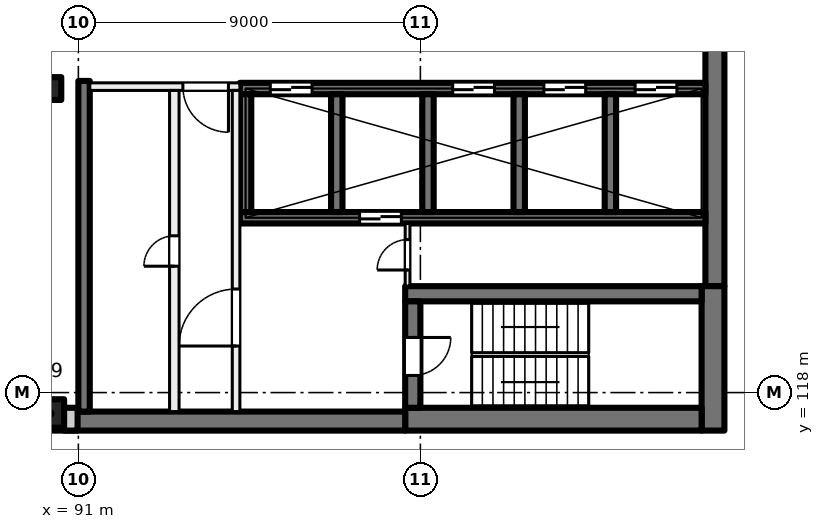
"""IFC4 building model, lengths in metres.
Left out: names, types, materials, properties, quantities, classifications, styles, units other than length and angle.
Written with IfcOpenShell. Run it as: python <this file> out.ifc"""

import sys

from ifc_helpers import new_model, si_unit, direction, frame, frame_2d, origin, origin_2d, place, context, subcontext, project, spatial, rectangle, extrude, element, fill, save


model = new_model("IFC4")
c1 = context("Model", 3, precision=1e-05, world=origin(), true_north=direction((0.0, 1.0)))
c2 = subcontext(c1, "Body", "Model", "MODEL_VIEW")
j1 = project(units=[si_unit("LENGTHUNIT", "METRE"), si_unit("PLANEANGLEUNIT", "RADIAN")], contexts=[c1])
p1 = place(None, origin())
s1 = spatial("IfcSite", under=j1, at=p1, CompositionType="ELEMENT")
p2 = place(p1, origin())
s2 = spatial("IfcBuilding", under=s1, at=p2, CompositionType="ELEMENT")
p3 = place(p2, frame((0.0, 0.0, 220.0)))
s3 = spatial("IfcBuildingStorey", under=s2, at=p3, CompositionType="ELEMENT", Elevation=220.0)
p4 = place(p3, frame((90.25, 126.0, 0.0), z_axis=(0.0, 0.0, 1.0), x_axis=(1.0, 0.0, 0.0)))
e1 = element("IfcColumn", 1, at=p4, inside=s3, PredefinedType="COLUMN", context=c2, shape_type="SweptSolid", body=[
    extrude(rectangle(XDim=0.6, YDim=0.6, at=origin_2d()), origin(), (0.0, 0.0, 1.0), 4.0),
])
p5 = place(p3, frame((90.25, 117.45, 0.0), z_axis=(0.0, 0.0, 1.0), x_axis=(1.0, 0.0, 0.0)))
e2 = element("IfcColumn", 2, at=p5, inside=s3, PredefinedType="COLUMN", context=c2, shape_type="SweptSolid", body=[
    extrude(rectangle(XDim=0.75, YDim=0.75, at=origin_2d()), origin(), (0.0, 0.0, 1.0), 4.0),
])
p6 = place(p3, frame((107.75, 135.2, 0.0), z_axis=(0.0, 0.0, 1.0), x_axis=(0.0, -1.0, 0.0)))
e3 = element("IfcWall", 3, at=p6, inside=s3, PredefinedType="SHEAR", context=c2, shape_type="SweptSolid", body=[
    extrude(rectangle(XDim=14.4, YDim=0.5, at=frame_2d((7.2, 0.0))), origin(), (0.0, 0.0, 1.0), 4.0),
])
p7 = place(p3, frame((107.7, 120.8, 0.0), z_axis=(0.0, 0.0, 1.0), x_axis=(0.0, -1.0, 0.0)))
e4 = element("IfcWall", 4, at=p7, inside=s3, PredefinedType="SHEAR", context=c2, shape_type="SweptSolid", body=[
    extrude(rectangle(XDim=3.8, YDim=0.6, at=frame_2d((1.9, 0.0))), origin(), (0.0, 0.0, 1.0), 4.0),
])
p8 = place(p3, frame((107.4, 117.3, 0.0), z_axis=(0.0, 0.0, 1.0), x_axis=(-1.0, 0.0, 0.0)))
e5 = element("IfcWall", 5, at=p8, inside=s3, PredefinedType="SHEAR", context=c2, shape_type="SweptSolid", body=[
    extrude(rectangle(XDim=7.8, YDim=0.6, at=frame_2d((3.9, 0.0))), origin(), (0.0, 0.0, 1.0), 4.0),
])
p9 = place(p3, frame((99.6, 117.25, 0.0), z_axis=(0.0, 0.0, 1.0), x_axis=(-1.0, 0.0, 0.0)))
e6 = element("IfcWall", 6, at=p9, inside=s3, PredefinedType="SHEAR", context=c2, shape_type="SweptSolid", body=[
    extrude(rectangle(XDim=8.975, YDim=0.5, at=frame_2d((4.488, 0.0))), origin(), (0.0, 0.0, 1.0), 4.0),
])
p10 = place(p3, frame((107.4, 120.6, 0.0), z_axis=(0.0, 0.0, 1.0), x_axis=(-1.0, 0.0, 0.0)))
e7 = element("IfcWall", 7, at=p10, inside=s3, PredefinedType="SHEAR", context=c2, shape_type="SweptSolid", body=[
    extrude(rectangle(XDim=7.8, YDim=0.4, at=frame_2d((3.9, 0.0))), origin(), (0.0, 0.0, 1.0), 4.0),
])
p11 = place(p3, frame((99.8, 120.4, 0.0), z_axis=(0.0, 0.0, 1.0), x_axis=(0.0, -1.0, 0.0)))
e8 = element("IfcWall", 8, at=p11, inside=s3, PredefinedType="SHEAR", context=c2, shape_type="SweptSolid", body=[
    extrude(rectangle(XDim=2.8, YDim=0.4, at=frame_2d((1.4, 0.0))), origin(), (0.0, 0.0, 1.0), 4.0),
])
p12 = place(p11, frame((0.95, 0.0, 0.0)))
e9 = element("IfcOpeningElement", 9, at=p12, cuts=e8, PredefinedType="OPENING", context=c2, shape_type="SweptSolid", body=[
    extrude(rectangle(XDim=1.0, YDim=2.1, at=frame_2d((0.5, 1.05))), frame((0.0, 0.21, 0.0), z_axis=(0.0, -1.0, 0.0), x_axis=(1.0, 0.0, 0.0)), (0.0, 0.0, 1.0), 0.42),
])
p13 = place(p3, frame((107.5, 126.0, 0.0), z_axis=(0.0, 0.0, 1.0), x_axis=(-1.0, 0.0, 0.0)))
e10 = element("IfcWall", 10, at=p13, inside=s3, PredefinedType="SHEAR", context=c2, shape_type="SweptSolid", body=[
    extrude(rectangle(XDim=12.25, YDim=0.3, at=frame_2d((6.125, 0.0))), origin(), (0.0, 0.0, 1.0), 4.0),
])
p14 = place(p13, frame((0.75, 0.0, 0.0)))
e11 = element("IfcOpeningElement", 11, at=p14, cuts=e10, PredefinedType="OPENING", context=c2, shape_type="SweptSolid", body=[
    extrude(rectangle(XDim=1.1, YDim=2.1, at=frame_2d((0.55, 1.05))), frame((0.0, 0.16, 0.0), z_axis=(0.0, -1.0, 0.0), x_axis=(1.0, 0.0, 0.0)), (0.0, 0.0, 1.0), 0.32),
])
p15 = place(p13, frame((3.15, 0.0, 0.0)))
e12 = element("IfcOpeningElement", 12, at=p15, cuts=e10, PredefinedType="OPENING", context=c2, shape_type="SweptSolid", body=[
    extrude(rectangle(XDim=1.1, YDim=2.1, at=frame_2d((0.55, 1.05))), frame((0.0, 0.16, 0.0), z_axis=(0.0, -1.0, 0.0), x_axis=(1.0, 0.0, 0.0)), (0.0, 0.0, 1.0), 0.32),
])
p16 = place(p13, frame((5.55, 0.0, 0.0)))
e13 = element("IfcOpeningElement", 13, at=p16, cuts=e10, PredefinedType="OPENING", context=c2, shape_type="SweptSolid", body=[
    extrude(rectangle(XDim=1.1, YDim=2.1, at=frame_2d((0.55, 1.05))), frame((0.0, 0.16, 0.0), z_axis=(0.0, -1.0, 0.0), x_axis=(1.0, 0.0, 0.0)), (0.0, 0.0, 1.0), 0.32),
])
p17 = place(p13, frame((10.35, 0.0, 0.0)))
e14 = element("IfcOpeningElement", 14, at=p17, cuts=e10, PredefinedType="OPENING", context=c2, shape_type="SweptSolid", body=[
    extrude(rectangle(XDim=1.1, YDim=2.1, at=frame_2d((0.55, 1.05))), frame((0.0, 0.16, 0.0), z_axis=(0.0, -1.0, 0.0), x_axis=(1.0, 0.0, 0.0)), (0.0, 0.0, 1.0), 0.32),
])
p18 = place(p3, frame((107.5, 122.6, 0.0), z_axis=(0.0, 0.0, 1.0), x_axis=(-1.0, 0.0, 0.0)))
e15 = element("IfcWall", 15, at=p18, inside=s3, PredefinedType="SHEAR", context=c2, shape_type="SweptSolid", body=[
    extrude(rectangle(XDim=12.25, YDim=0.3, at=frame_2d((6.125, 0.0))), origin(), (0.0, 0.0, 1.0), 4.0),
])
p19 = place(p18, frame((8.0, 0.0, 0.0)))
e16 = element("IfcOpeningElement", 16, at=p19, cuts=e15, PredefinedType="OPENING", context=c2, shape_type="SweptSolid", body=[
    extrude(rectangle(XDim=1.1, YDim=2.1, at=frame_2d((0.55, 1.05))), frame((0.0, 0.16, 0.0), z_axis=(0.0, -1.0, 0.0), x_axis=(1.0, 0.0, 0.0)), (0.0, 0.0, 1.0), 0.32),
])
for number, where, z_axis, x_axis in (
    (17, (105.0, 125.85, 0.0), (0.0, 0.0, 1.0), (0.0, -1.0, 0.0)),
    (18, (102.6, 125.85, 0.0), (0.0, 0.0, 1.0), (0.0, -1.0, 0.0)),
    (19, (100.2, 125.85, 0.0), (0.0, 0.0, 1.0), (0.0, -1.0, 0.0)),
    (20, (97.8, 125.85, 0.0), (0.0, 0.0, 1.0), (0.0, -1.0, 0.0)),
    (21, (95.4, 125.85, 0.0), (0.0, 0.0, 1.0), (0.0, -1.0, 0.0)),
):
    element("IfcWall", number, at=place(p3, frame(where, z_axis=z_axis, x_axis=x_axis)), inside=s3, PredefinedType="SHEAR", context=c2, shape_type="SweptSolid", body=[
        extrude(rectangle(XDim=3.1, YDim=0.3, at=frame_2d((1.55, 0.0))), origin(), (0.0, 0.0, 1.0), 4.0),
    ])
p20 = place(p3, frame((91.15, 126.2, 0.0), z_axis=(0.0, 0.0, 1.0), x_axis=(0.0, -1.0, 0.0)))
e22 = element("IfcWall", 22, at=p20, inside=s3, PredefinedType="SHEAR", context=c2, shape_type="SweptSolid", body=[
    extrude(rectangle(XDim=8.7, YDim=0.3, at=frame_2d((4.35, 0.0))), origin(), (0.0, 0.0, 1.0), 4.0),
])
p21 = place(p3, frame((90.98, 117.3, 0.0), z_axis=(0.0, 0.0, 1.0), x_axis=(-1.0, 0.0, 0.0)))
e23 = element("IfcWall", 23, at=p21, inside=s3, PredefinedType="SOLIDWALL", context=c2, shape_type="SweptSolid", body=[
    extrude(rectangle(XDim=33.745, YDim=0.6, at=frame_2d((16.873, 0.0))), origin(), (0.0, 0.0, 1.0), 3.625),
])
p22 = place(p21, frame((1.48, 0.0, 0.9)))
e24 = element("IfcOpeningElement", 24, at=p22, cuts=e23, PredefinedType="OPENING", context=c2, shape_type="SweptSolid", body=[
    extrude(rectangle(XDim=3.0, YDim=2.4, at=frame_2d((1.5, 1.2))), frame((0.0, 0.31, 0.0), z_axis=(0.0, -1.0, 0.0), x_axis=(1.0, 0.0, 0.0)), (0.0, 0.0, 1.0), 0.62),
])
p23 = place(p21, frame((5.98, 0.0, 0.9)))
e25 = element("IfcOpeningElement", 25, at=p23, cuts=e23, PredefinedType="OPENING", context=c2, shape_type="SweptSolid", body=[
    extrude(rectangle(XDim=3.0, YDim=2.4, at=frame_2d((1.5, 1.2))), frame((0.0, 0.31, 0.0), z_axis=(0.0, -1.0, 0.0), x_axis=(1.0, 0.0, 0.0)), (0.0, 0.0, 1.0), 0.62),
])
p24 = place(p21, frame((10.48, 0.0, 0.9)))
e26 = element("IfcOpeningElement", 26, at=p24, cuts=e23, PredefinedType="OPENING", context=c2, shape_type="SweptSolid", body=[
    extrude(rectangle(XDim=3.0, YDim=2.4, at=frame_2d((1.5, 1.2))), frame((0.0, 0.31, 0.0), z_axis=(0.0, -1.0, 0.0), x_axis=(1.0, 0.0, 0.0)), (0.0, 0.0, 1.0), 0.62),
])
p25 = place(p21, frame((14.98, 0.0, 0.9)))
e27 = element("IfcOpeningElement", 27, at=p25, cuts=e23, PredefinedType="OPENING", context=c2, shape_type="SweptSolid", body=[
    extrude(rectangle(XDim=3.0, YDim=2.4, at=frame_2d((1.5, 1.2))), frame((0.0, 0.31, 0.0), z_axis=(0.0, -1.0, 0.0), x_axis=(1.0, 0.0, 0.0)), (0.0, 0.0, 1.0), 0.62),
])
p26 = place(p21, frame((19.48, 0.0, 0.9)))
e28 = element("IfcOpeningElement", 28, at=p26, cuts=e23, PredefinedType="OPENING", context=c2, shape_type="SweptSolid", body=[
    extrude(rectangle(XDim=3.0, YDim=2.4, at=frame_2d((1.5, 1.2))), frame((0.0, 0.31, 0.0), z_axis=(0.0, -1.0, 0.0), x_axis=(1.0, 0.0, 0.0)), (0.0, 0.0, 1.0), 0.62),
])
p27 = place(p21, frame((23.98, 0.0, 0.9)))
e29 = element("IfcOpeningElement", 29, at=p27, cuts=e23, PredefinedType="OPENING", context=c2, shape_type="SweptSolid", body=[
    extrude(rectangle(XDim=3.0, YDim=2.4, at=frame_2d((1.5, 1.2))), frame((0.0, 0.31, 0.0), z_axis=(0.0, -1.0, 0.0), x_axis=(1.0, 0.0, 0.0)), (0.0, 0.0, 1.0), 0.62),
])
p28 = place(p21, frame((28.48, 0.0, 0.9)))
e30 = element("IfcOpeningElement", 30, at=p28, cuts=e23, PredefinedType="OPENING", context=c2, shape_type="SweptSolid", body=[
    extrude(rectangle(XDim=3.0, YDim=2.4, at=frame_2d((1.5, 1.2))), frame((0.0, 0.31, 0.0), z_axis=(0.0, -1.0, 0.0), x_axis=(1.0, 0.0, 0.0)), (0.0, 0.0, 1.0), 0.62),
])
p29 = place(p3, frame((95.25, 126.05, 0.0), z_axis=(0.0, 0.0, 1.0), x_axis=(-1.0, 0.0, 0.0)))
e31 = element("IfcWall", 31, at=p29, inside=s3, PredefinedType="PARTITIONING", context=c2, shape_type="SweptSolid", body=[
    extrude(rectangle(XDim=3.95, YDim=0.2, at=frame_2d((1.975, 0.0))), origin(), (0.0, 0.0, 1.0), 3.625),
])
p30 = place(p29, frame((0.3, 0.0, 0.0)))
e32 = element("IfcOpeningElement", 32, at=p30, cuts=e31, PredefinedType="OPENING", context=c2, shape_type="SweptSolid", body=[
    extrude(rectangle(XDim=1.2, YDim=2.1, at=frame_2d((0.6, 1.05))), frame((0.0, 0.11, 0.0), z_axis=(0.0, -1.0, 0.0), x_axis=(1.0, 0.0, 0.0)), (0.0, 0.0, 1.0), 0.22),
])
p31 = place(p3, frame((95.15, 117.5, 0.0), z_axis=(0.0, 0.0, 1.0), x_axis=(0.0, 1.0, 0.0)))
e33 = element("IfcWall", 33, at=p31, inside=s3, PredefinedType="PARTITIONING", context=c2, shape_type="SweptSolid", body=[
    extrude(rectangle(XDim=8.45, YDim=0.2, at=frame_2d((4.225, 0.0))), origin(), (0.0, 0.0, 1.0), 3.625),
])
p32 = place(p31, frame((1.725, 0.0, 0.0)))
e34 = element("IfcOpeningElement", 34, at=p32, cuts=e33, PredefinedType="OPENING", context=c2, shape_type="SweptSolid", body=[
    extrude(rectangle(XDim=1.5, YDim=2.1, at=frame_2d((0.75, 1.05))), frame((0.0, 0.11, 0.0), z_axis=(0.0, -1.0, 0.0), x_axis=(1.0, 0.0, 0.0)), (0.0, 0.0, 1.0), 0.22),
])
p33 = place(p3, frame((93.525, 117.5, 0.0), z_axis=(0.0, 0.0, 1.0), x_axis=(0.0, 1.0, 0.0)))
e35 = element("IfcWall", 35, at=p33, inside=s3, PredefinedType="PARTITIONING", context=c2, shape_type="SweptSolid", body=[
    extrude(rectangle(XDim=8.45, YDim=0.25, at=frame_2d((4.225, 0.0))), origin(), (0.0, 0.0, 1.0), 3.625),
])
p34 = place(p33, frame((3.825, 0.0, 0.0)))
e36 = element("IfcOpeningElement", 36, at=p34, cuts=e35, PredefinedType="OPENING", context=c2, shape_type="SweptSolid", body=[
    extrude(rectangle(XDim=0.8, YDim=2.1, at=frame_2d((0.4, 1.05))), frame((0.0, 0.135, 0.0), z_axis=(0.0, -1.0, 0.0), x_axis=(1.0, 0.0, 0.0)), (0.0, 0.0, 1.0), 0.27),
])
p35 = place(p3, frame((99.663, 120.8, 0.0), z_axis=(0.0, 0.0, 1.0), x_axis=(0.0, 1.0, 0.0)))
e37 = element("IfcWall", 37, at=p35, inside=s3, PredefinedType="PARTITIONING", context=c2, shape_type="SweptSolid", body=[
    extrude(rectangle(XDim=1.65, YDim=0.125, at=frame_2d((0.825, 0.0))), origin(), (0.0, 0.0, 1.0), 3.625),
])
p36 = place(p35, frame((0.425, 0.0, 0.0)))
e38 = element("IfcOpeningElement", 38, at=p36, cuts=e37, PredefinedType="OPENING", context=c2, shape_type="SweptSolid", body=[
    extrude(rectangle(XDim=0.8, YDim=2.1, at=frame_2d((0.4, 1.05))), frame((0.0, 0.073, 0.0), z_axis=(0.0, -1.0, 0.0), x_axis=(1.0, 0.0, 0.0)), (0.0, 0.0, 1.0), 0.145),
])
p37 = place(p14, origin())
e39 = element("IfcDoor", 39, at=p37, inside=s3, OperationType="DOUBLE_DOOR_SLIDING", PredefinedType="DOOR", context=c2, shape_type="SweptSolid", body=[
    extrude(rectangle(XDim=1.1, YDim=2.1, at=frame_2d((0.55, 1.05))), frame((0.0, 0.025, 0.0), z_axis=(0.0, -1.0, 0.0), x_axis=(1.0, 0.0, 0.0)), (0.0, 0.0, 1.0), 0.05),
])
fill(e11, e39)
p38 = place(p15, origin())
e40 = element("IfcDoor", 40, at=p38, inside=s3, OperationType="DOUBLE_DOOR_SLIDING", PredefinedType="DOOR", context=c2, shape_type="SweptSolid", body=[
    extrude(rectangle(XDim=1.1, YDim=2.1, at=frame_2d((0.55, 1.05))), frame((0.0, 0.025, 0.0), z_axis=(0.0, -1.0, 0.0), x_axis=(1.0, 0.0, 0.0)), (0.0, 0.0, 1.0), 0.05),
])
fill(e12, e40)
p39 = place(p16, origin())
e41 = element("IfcDoor", 41, at=p39, inside=s3, OperationType="DOUBLE_DOOR_SLIDING", PredefinedType="DOOR", context=c2, shape_type="SweptSolid", body=[
    extrude(rectangle(XDim=1.1, YDim=2.1, at=frame_2d((0.55, 1.05))), frame((0.0, 0.025, 0.0), z_axis=(0.0, -1.0, 0.0), x_axis=(1.0, 0.0, 0.0)), (0.0, 0.0, 1.0), 0.05),
])
fill(e13, e41)
p40 = place(p17, origin())
e42 = element("IfcDoor", 42, at=p40, inside=s3, OperationType="DOUBLE_DOOR_SLIDING", PredefinedType="DOOR", context=c2, shape_type="SweptSolid", body=[
    extrude(rectangle(XDim=1.1, YDim=2.1, at=frame_2d((0.55, 1.05))), frame((0.0, 0.025, 0.0), z_axis=(0.0, -1.0, 0.0), x_axis=(1.0, 0.0, 0.0)), (0.0, 0.0, 1.0), 0.05),
])
fill(e14, e42)
p41 = place(p30, origin())
e43 = element("IfcDoor", 43, at=p41, inside=s3, OperationType="DOUBLE_DOOR_SINGLE_SWING", PredefinedType="DOOR", context=c2, shape_type="SweptSolid", body=[
    extrude(rectangle(XDim=1.2, YDim=2.1, at=frame_2d((0.6, 1.05))), frame((0.0, 0.025, 0.0), z_axis=(0.0, -1.0, 0.0), x_axis=(1.0, 0.0, 0.0)), (0.0, 0.0, 1.0), 0.05),
])
fill(e32, e43)
p42 = place(p32, origin())
e44 = element("IfcDoor", 44, at=p42, inside=s3, OperationType="DOUBLE_DOOR_SINGLE_SWING", PredefinedType="DOOR", context=c2, shape_type="SweptSolid", body=[
    extrude(rectangle(XDim=1.5, YDim=2.1, at=frame_2d((0.75, 1.05))), frame((0.0, 0.025, 0.0), z_axis=(0.0, -1.0, 0.0), x_axis=(1.0, 0.0, 0.0)), (0.0, 0.0, 1.0), 0.05),
])
fill(e34, e44)
p43 = place(p12, origin())
e45 = element("IfcDoor", 45, at=p43, inside=s3, OperationType="SINGLE_SWING_LEFT", PredefinedType="DOOR", context=c2, shape_type="SweptSolid", body=[
    extrude(rectangle(XDim=1.0, YDim=2.1, at=frame_2d((0.5, 1.05))), frame((0.0, 0.025, 0.0), z_axis=(0.0, -1.0, 0.0), x_axis=(1.0, 0.0, 0.0)), (0.0, 0.0, 1.0), 0.05),
])
fill(e9, e45)
p44 = place(p36, origin())
e46 = element("IfcDoor", 46, at=p44, inside=s3, OperationType="SINGLE_SWING_RIGHT", PredefinedType="DOOR", context=c2, shape_type="SweptSolid", body=[
    extrude(rectangle(XDim=0.8, YDim=2.1, at=frame_2d((0.4, 1.05))), frame((0.0, 0.025, 0.0), z_axis=(0.0, -1.0, 0.0), x_axis=(1.0, 0.0, 0.0)), (0.0, 0.0, 1.0), 0.05),
])
fill(e38, e46)
p45 = place(p34, origin())
e47 = element("IfcDoor", 47, at=p45, inside=s3, OperationType="SINGLE_SWING_LEFT", PredefinedType="DOOR", context=c2, shape_type="SweptSolid", body=[
    extrude(rectangle(XDim=0.8, YDim=2.1, at=frame_2d((0.4, 1.05))), frame((0.0, 0.025, 0.0), z_axis=(0.0, -1.0, 0.0), x_axis=(1.0, 0.0, 0.0)), (0.0, 0.0, 1.0), 0.05),
])
fill(e36, e47)
p46 = place(p19, origin())
e48 = element("IfcDoor", 48, at=p46, inside=s3, OperationType="DOUBLE_DOOR_SLIDING", PredefinedType="DOOR", context=c2, shape_type="SweptSolid", body=[
    extrude(rectangle(XDim=1.1, YDim=2.1, at=frame_2d((0.55, 1.05))), frame((0.0, 0.025, 0.0), z_axis=(0.0, -1.0, 0.0), x_axis=(1.0, 0.0, 0.0)), (0.0, 0.0, 1.0), 0.05),
])
fill(e16, e48)
save(model, sys.argv[1])
